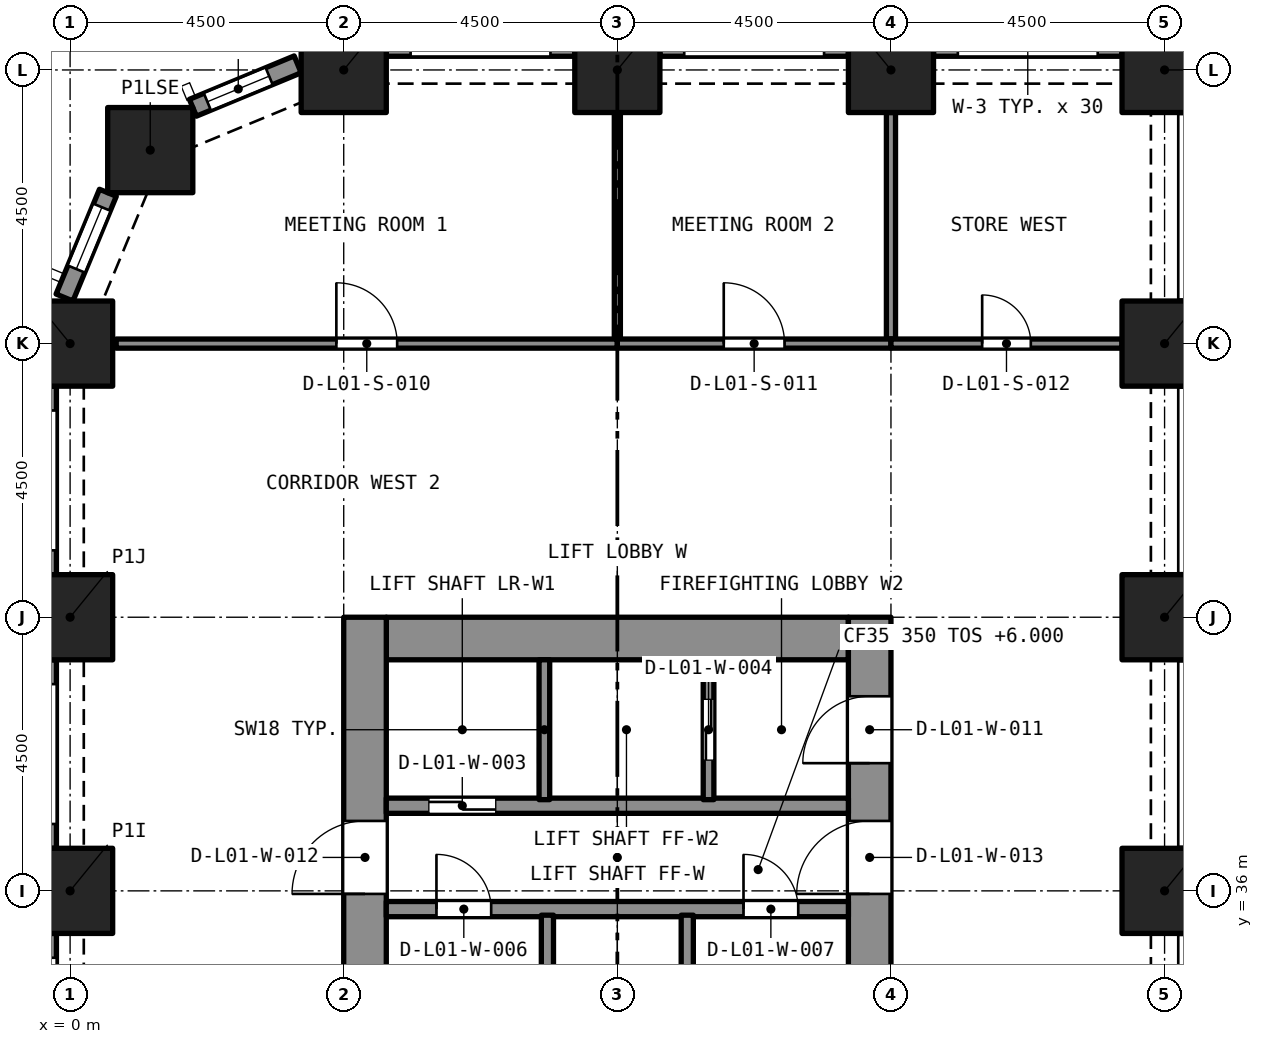
"""IFC4 building model, lengths in metres.
Left out: names, types, materials, properties, quantities, classifications, styles, units other than length and angle.
Written with IfcOpenShell. Run it as: python <this file> out.ifc"""

import sys

from ifc_helpers import new_model, si_unit, direction, frame, frame_2d, origin, origin_2d, place, context, subcontext, project, spatial, rectangle, extrude, element, fill, save


model = new_model("IFC4")
c1 = context("Model", 3, precision=1e-05, world=origin(), true_north=direction((0.0, 1.0)))
c2 = subcontext(c1, "Body", "Model", "MODEL_VIEW")
j1 = project(units=[si_unit("LENGTHUNIT", "METRE"), si_unit("PLANEANGLEUNIT", "RADIAN")], contexts=[c1])
p1 = place(None, origin())
s1 = spatial("IfcSite", under=j1, at=p1, CompositionType="ELEMENT")
p2 = place(p1, origin())
s2 = spatial("IfcBuilding", under=s1, at=p2, CompositionType="ELEMENT")
p3 = place(p2, frame((0.0, 0.0, 6.0)))
s3 = spatial("IfcBuildingStorey", under=s2, at=p3, CompositionType="ELEMENT", Elevation=6.0)
for number, where, z_axis, x_axis in (
    (1, (0.0, 36.0, 0.0), (0.0, 0.0, 1.0), (1.0, 0.0, 0.0)),
    (2, (18.0, 36.0, 0.0), (0.0, 0.0, 1.0), (1.0, 0.0, 0.0)),
    (3, (0.0, 40.5, 0.0), (0.0, 0.0, 1.0), (1.0, 0.0, 0.0)),
    (4, (18.0, 40.5, 0.0), (0.0, 0.0, 1.0), (1.0, 0.0, 0.0)),
    (5, (0.0, 45.0, 0.0), (0.0, 0.0, 1.0), (1.0, 0.0, 0.0)),
    (6, (18.0, 45.0, 0.0), (0.0, 0.0, 1.0), (1.0, 0.0, 0.0)),
    (7, (1.318, 48.182, 0.0), (0.0, 0.0, 1.0), (1.0, 0.0, 0.0)),
    (8, (4.5, 49.5, 0.0), (0.0, 0.0, 1.0), (1.0, 0.0, 0.0)),
    (9, (9.0, 49.5, 0.0), (0.0, 0.0, 1.0), (1.0, 0.0, 0.0)),
    (10, (13.5, 49.5, 0.0), (0.0, 0.0, 1.0), (1.0, 0.0, 0.0)),
    (11, (18.0, 49.5, 0.0), (0.0, 0.0, 1.0), (1.0, 0.0, 0.0)),
):
    element("IfcColumn", number, at=place(p3, frame(where, z_axis=z_axis, x_axis=x_axis)), inside=s3, PredefinedType="COLUMN", context=c2, shape_type="SweptSolid", body=[
        extrude(rectangle(XDim=1.4, YDim=1.4, at=origin_2d()), origin(), (0.0, 0.0, 1.0), 5.0),
    ])
p4 = place(p3, frame((5.2, 40.15, 0.0), z_axis=(0.0, 0.0, 1.0), x_axis=(1.0, 0.0, 0.0)))
e12 = element("IfcWall", 12, at=p4, inside=s3, PredefinedType="SOLIDWALL", context=c2, shape_type="SweptSolid", body=[
    extrude(rectangle(XDim=7.6, YDim=0.7, at=frame_2d((3.8, 0.0))), origin(), (0.0, 0.0, 1.0), 5.0),
])
p5 = place(p3, frame((4.85, 27.0, 0.0), z_axis=(0.0, 0.0, 1.0), x_axis=(0.0, 1.0, 0.0)))
e13 = element("IfcWall", 13, at=p5, inside=s3, PredefinedType="SOLIDWALL", context=c2, shape_type="SweptSolid", body=[
    extrude(rectangle(XDim=13.5, YDim=0.7, at=frame_2d((6.75, 0.0))), origin(), (0.0, 0.0, 1.0), 5.0),
])
p6 = place(p5, frame((8.95, 0.0, 0.0)))
e14 = element("IfcOpeningElement", 14, at=p6, cuts=e13, PredefinedType="OPENING", context=c2, shape_type="SweptSolid", body=[
    extrude(rectangle(XDim=1.2, YDim=2.1, at=frame_2d((0.6, 1.05))), frame((0.0, 0.36, 0.0), z_axis=(0.0, -1.0, 0.0), x_axis=(1.0, 0.0, 0.0)), (0.0, 0.0, 1.0), 0.72),
])
p7 = place(p3, frame((13.15, 27.0, 0.0), z_axis=(0.0, 0.0, 1.0), x_axis=(0.0, 1.0, 0.0)))
e15 = element("IfcWall", 15, at=p7, inside=s3, PredefinedType="SOLIDWALL", context=c2, shape_type="SweptSolid", body=[
    extrude(rectangle(XDim=13.5, YDim=0.7, at=frame_2d((6.75, 0.0))), origin(), (0.0, 0.0, 1.0), 5.0),
])
p8 = place(p7, frame((11.1, 0.0, 0.0)))
e16 = element("IfcOpeningElement", 16, at=p8, cuts=e15, PredefinedType="OPENING", context=c2, shape_type="SweptSolid", body=[
    extrude(rectangle(XDim=1.1, YDim=2.1, at=frame_2d((0.55, 1.05))), frame((0.0, 0.36, 0.0), z_axis=(0.0, -1.0, 0.0), x_axis=(1.0, 0.0, 0.0)), (0.0, 0.0, 1.0), 0.72),
])
p9 = place(p7, frame((8.95, 0.0, 0.0)))
e17 = element("IfcOpeningElement", 17, at=p9, cuts=e15, PredefinedType="OPENING", context=c2, shape_type="SweptSolid", body=[
    extrude(rectangle(XDim=1.2, YDim=2.1, at=frame_2d((0.6, 1.05))), frame((0.0, 0.36, 0.0), z_axis=(0.0, -1.0, 0.0), x_axis=(1.0, 0.0, 0.0)), (0.0, 0.0, 1.0), 0.72),
])
p10 = place(p3, frame((14.2, 49.875, 0.0), z_axis=(0.0, 0.0, 1.0), x_axis=(1.0, 0.0, 0.0)))
e18 = element("IfcWall", 18, at=p10, inside=s3, PredefinedType="SOLIDWALL", context=c2, shape_type="SweptSolid", body=[
    extrude(rectangle(XDim=3.1, YDim=0.3, at=frame_2d((1.55, 0.0))), origin(), (0.0, 0.0, 1.0), 5.0),
])
p11 = place(p10, frame((0.4, 0.0, 0.45)))
e19 = element("IfcOpeningElement", 19, at=p11, cuts=e18, PredefinedType="OPENING", context=c2, shape_type="SweptSolid", body=[
    extrude(rectangle(XDim=2.3, YDim=3.3, at=frame_2d((1.15, 1.65))), frame((0.0, 0.16, 0.0), z_axis=(0.0, -1.0, 0.0), x_axis=(1.0, 0.0, 0.0)), (0.0, 0.0, 1.0), 0.32),
])
p12 = place(p3, frame((9.7, 49.875, 0.0), z_axis=(0.0, 0.0, 1.0), x_axis=(1.0, 0.0, 0.0)))
e20 = element("IfcWall", 20, at=p12, inside=s3, PredefinedType="SOLIDWALL", context=c2, shape_type="SweptSolid", body=[
    extrude(rectangle(XDim=3.1, YDim=0.3, at=frame_2d((1.55, 0.0))), origin(), (0.0, 0.0, 1.0), 5.0),
])
p13 = place(p12, frame((0.4, 0.0, 0.45)))
e21 = element("IfcOpeningElement", 21, at=p13, cuts=e20, PredefinedType="OPENING", context=c2, shape_type="SweptSolid", body=[
    extrude(rectangle(XDim=2.3, YDim=3.3, at=frame_2d((1.15, 1.65))), frame((0.0, 0.16, 0.0), z_axis=(0.0, -1.0, 0.0), x_axis=(1.0, 0.0, 0.0)), (0.0, 0.0, 1.0), 0.32),
])
p14 = place(p3, frame((5.2, 49.875, 0.0), z_axis=(0.0, 0.0, 1.0), x_axis=(1.0, 0.0, 0.0)))
e22 = element("IfcWall", 22, at=p14, inside=s3, PredefinedType="SOLIDWALL", context=c2, shape_type="SweptSolid", body=[
    extrude(rectangle(XDim=3.1, YDim=0.3, at=frame_2d((1.55, 0.0))), origin(), (0.0, 0.0, 1.0), 5.0),
])
p15 = place(p14, frame((0.4, 0.0, 0.45)))
e23 = element("IfcOpeningElement", 23, at=p15, cuts=e22, PredefinedType="OPENING", context=c2, shape_type="SweptSolid", body=[
    extrude(rectangle(XDim=2.3, YDim=3.3, at=frame_2d((1.15, 1.65))), frame((0.0, 0.16, 0.0), z_axis=(0.0, -1.0, 0.0), x_axis=(1.0, 0.0, 0.0)), (0.0, 0.0, 1.0), 0.32),
])
p16 = place(p3, frame((2.02, 48.878, 0.0), z_axis=(0.0, 0.0, 1.0), x_axis=(0.923903565336, 0.38262540684, 0.0)))
e24 = element("IfcWall", 24, at=p16, inside=s3, PredefinedType="SOLIDWALL", context=c2, shape_type="SweptSolid", body=[
    extrude(rectangle(XDim=1.865, YDim=0.3, at=frame_2d((0.933, 0.0))), origin(), (0.0, 0.0, 1.0), 5.0),
])
p17 = place(p16, frame((0.258, 0.0, 0.45)))
e25 = element("IfcOpeningElement", 25, at=p17, cuts=e24, PredefinedType="OPENING", context=c2, shape_type="SweptSolid", body=[
    extrude(rectangle(XDim=1.1, YDim=3.3, at=frame_2d((0.55, 1.65))), frame((0.0, 0.16, 0.0), z_axis=(0.0, -1.0, 0.0), x_axis=(1.0, 0.0, 0.0)), (0.0, 0.0, 1.0), 0.32),
])
p18 = place(p3, frame((-0.092, 45.757, 0.0), z_axis=(0.0, 0.0, 1.0), x_axis=(0.382737135771, 0.923857286003, 0.0)))
e26 = element("IfcWall", 26, at=p18, inside=s3, PredefinedType="SOLIDWALL", context=c2, shape_type="SweptSolid", body=[
    extrude(rectangle(XDim=1.865, YDim=0.3, at=frame_2d((0.933, 0.0))), origin(), (0.0, 0.0, 1.0), 5.0),
])
p19 = place(p18, frame((0.508, 0.0, 0.45)))
e27 = element("IfcOpeningElement", 27, at=p19, cuts=e26, PredefinedType="OPENING", context=c2, shape_type="SweptSolid", body=[
    extrude(rectangle(XDim=1.1, YDim=3.3, at=frame_2d((0.55, 1.65))), frame((0.0, 0.16, 0.0), z_axis=(0.0, -1.0, 0.0), x_axis=(1.0, 0.0, 0.0)), (0.0, 0.0, 1.0), 0.32),
])
p20 = place(p3, frame((-0.375, 41.2, 0.0), z_axis=(0.0, 0.0, 1.0), x_axis=(0.0, 1.0, 0.0)))
e28 = element("IfcWall", 28, at=p20, inside=s3, PredefinedType="SOLIDWALL", context=c2, shape_type="SweptSolid", body=[
    extrude(rectangle(XDim=3.1, YDim=0.3, at=frame_2d((1.55, 0.0))), origin(), (0.0, 0.0, 1.0), 5.0),
])
p21 = place(p20, frame((0.4, 0.0, 0.45)))
e29 = element("IfcOpeningElement", 29, at=p21, cuts=e28, PredefinedType="OPENING", context=c2, shape_type="SweptSolid", body=[
    extrude(rectangle(XDim=2.3, YDim=3.3, at=frame_2d((1.15, 1.65))), frame((0.0, 0.16, 0.0), z_axis=(0.0, -1.0, 0.0), x_axis=(1.0, 0.0, 0.0)), (0.0, 0.0, 1.0), 0.32),
])
p22 = place(p3, frame((-0.375, 36.7, 0.0), z_axis=(0.0, 0.0, 1.0), x_axis=(0.0, 1.0, 0.0)))
e30 = element("IfcWall", 30, at=p22, inside=s3, PredefinedType="SOLIDWALL", context=c2, shape_type="SweptSolid", body=[
    extrude(rectangle(XDim=3.1, YDim=0.3, at=frame_2d((1.55, 0.0))), origin(), (0.0, 0.0, 1.0), 5.0),
])
p23 = place(p22, frame((0.4, 0.0, 0.45)))
e31 = element("IfcOpeningElement", 31, at=p23, cuts=e30, PredefinedType="OPENING", context=c2, shape_type="SweptSolid", body=[
    extrude(rectangle(XDim=2.3, YDim=3.3, at=frame_2d((1.15, 1.65))), frame((0.0, 0.16, 0.0), z_axis=(0.0, -1.0, 0.0), x_axis=(1.0, 0.0, 0.0)), (0.0, 0.0, 1.0), 0.32),
])
p24 = place(p3, frame((-0.375, 32.2, 0.0), z_axis=(0.0, 0.0, 1.0), x_axis=(0.0, 1.0, 0.0)))
e32 = element("IfcWall", 32, at=p24, inside=s3, PredefinedType="SOLIDWALL", context=c2, shape_type="SweptSolid", body=[
    extrude(rectangle(XDim=3.1, YDim=0.3, at=frame_2d((1.55, 0.0))), origin(), (0.0, 0.0, 1.0), 5.0),
])
p25 = place(p24, frame((0.4, 0.0, 0.45)))
e33 = element("IfcOpeningElement", 33, at=p25, cuts=e32, PredefinedType="OPENING", context=c2, shape_type="SweptSolid", body=[
    extrude(rectangle(XDim=2.3, YDim=3.3, at=frame_2d((1.15, 1.65))), frame((0.0, 0.16, 0.0), z_axis=(0.0, -1.0, 0.0), x_axis=(1.0, 0.0, 0.0)), (0.0, 0.0, 1.0), 0.32),
])
p26 = place(p3, frame((5.2, 35.7, 0.0), z_axis=(0.0, 0.0, 1.0), x_axis=(1.0, 0.0, 0.0)))
e34 = element("IfcWall", 34, at=p26, inside=s3, PredefinedType="SOLIDWALL", context=c2, shape_type="SweptSolid", body=[
    extrude(rectangle(XDim=7.6, YDim=0.25, at=frame_2d((3.8, 0.0))), origin(), (0.0, 0.0, 1.0), 4.65),
])
p27 = place(p26, frame((0.825, 0.0, 0.0)))
e35 = element("IfcOpeningElement", 35, at=p27, cuts=e34, PredefinedType="OPENING", context=c2, shape_type="SweptSolid", body=[
    extrude(rectangle(XDim=0.9, YDim=2.1, at=frame_2d((0.45, 1.05))), frame((0.0, 0.135, 0.0), z_axis=(0.0, -1.0, 0.0), x_axis=(1.0, 0.0, 0.0)), (0.0, 0.0, 1.0), 0.27),
])
p28 = place(p26, frame((5.875, 0.0, 0.0)))
e36 = element("IfcOpeningElement", 36, at=p28, cuts=e34, PredefinedType="OPENING", context=c2, shape_type="SweptSolid", body=[
    extrude(rectangle(XDim=0.9, YDim=2.1, at=frame_2d((0.45, 1.05))), frame((0.0, 0.135, 0.0), z_axis=(0.0, -1.0, 0.0), x_axis=(1.0, 0.0, 0.0)), (0.0, 0.0, 1.0), 0.27),
])
p29 = place(p3, frame((5.2, 37.4, 0.0), z_axis=(0.0, 0.0, 1.0), x_axis=(1.0, 0.0, 0.0)))
e37 = element("IfcWall", 37, at=p29, inside=s3, PredefinedType="SOLIDWALL", context=c2, shape_type="SweptSolid", body=[
    extrude(rectangle(XDim=7.6, YDim=0.25, at=frame_2d((3.8, 0.0))), origin(), (0.0, 0.0, 1.0), 4.65),
])
p30 = place(p29, frame((0.7, 0.0, 0.0)))
e38 = element("IfcOpeningElement", 38, at=p30, cuts=e37, PredefinedType="OPENING", context=c2, shape_type="SweptSolid", body=[
    extrude(rectangle(XDim=1.1, YDim=2.4, at=frame_2d((0.55, 1.2))), frame((0.0, 0.135, 0.0), z_axis=(0.0, -1.0, 0.0), x_axis=(1.0, 0.0, 0.0)), (0.0, 0.0, 1.0), 0.27),
])
for number, where, z_axis, x_axis in (
    (39, (7.85, 33.3, 0.0), (0.0, 0.0, 1.0), (0.0, 1.0, 0.0)),
    (40, (10.15, 33.3, 0.0), (0.0, 0.0, 1.0), (0.0, 1.0, 0.0)),
):
    element("IfcWall", number, at=place(p3, frame(where, z_axis=z_axis, x_axis=x_axis)), inside=s3, PredefinedType="SOLIDWALL", context=c2, shape_type="SweptSolid", body=[
        extrude(rectangle(XDim=2.3, YDim=0.2, at=frame_2d((1.15, 0.0))), origin(), (0.0, 0.0, 1.0), 4.65),
    ])
p31 = place(p3, frame((7.8, 37.5, 0.0), z_axis=(0.0, 0.0, 1.0), x_axis=(0.0, 1.0, 0.0)))
e41 = element("IfcWall", 41, at=p31, inside=s3, PredefinedType="SOLIDWALL", context=c2, shape_type="SweptSolid", body=[
    extrude(rectangle(XDim=2.3, YDim=0.175, at=frame_2d((1.15, 0.0))), origin(), (0.0, 0.0, 1.0), 4.65),
])
p32 = place(p3, frame((10.5, 37.5, 0.0), z_axis=(0.0, 0.0, 1.0), x_axis=(0.0, 1.0, 0.0)))
e42 = element("IfcWall", 42, at=p32, inside=s3, PredefinedType="SOLIDWALL", context=c2, shape_type="SweptSolid", body=[
    extrude(rectangle(XDim=2.3, YDim=0.175, at=frame_2d((1.15, 0.0))), origin(), (0.0, 0.0, 1.0), 4.65),
])
p33 = place(p32, frame((0.65, 0.0, 0.0)))
e43 = element("IfcOpeningElement", 43, at=p33, cuts=e42, PredefinedType="OPENING", context=c2, shape_type="SweptSolid", body=[
    extrude(rectangle(XDim=1.0, YDim=2.1, at=frame_2d((0.5, 1.05))), frame((0.0, 0.097, 0.0), z_axis=(0.0, -1.0, 0.0), x_axis=(1.0, 0.0, 0.0)), (0.0, 0.0, 1.0), 0.195),
])
p34 = place(p3, frame((9.0, 45.075, 0.0), z_axis=(0.0, 0.0, 1.0), x_axis=(0.0, 1.0, 0.0)))
e44 = element("IfcWall", 44, at=p34, inside=s3, PredefinedType="PARTITIONING", context=c2, shape_type="SweptSolid", body=[
    extrude(rectangle(XDim=3.725, YDim=0.1, at=frame_2d((1.863, 0.0))), origin(), (0.0, 0.0, 1.0), 4.65),
])
p35 = place(p3, frame((0.758, 45.0, 0.0), z_axis=(0.0, 0.0, 1.0), x_axis=(1.0, 0.0, 0.0)))
e45 = element("IfcWall", 45, at=p35, inside=s3, PredefinedType="PARTITIONING", context=c2, shape_type="SweptSolid", body=[
    extrude(rectangle(XDim=8.242, YDim=0.15, at=frame_2d((4.121, 0.0))), origin(), (0.0, 0.0, 1.0), 4.65),
])
p36 = place(p35, frame((3.621, 0.0, 0.0)))
e46 = element("IfcOpeningElement", 46, at=p36, cuts=e45, PredefinedType="OPENING", context=c2, shape_type="SweptSolid", body=[
    extrude(rectangle(XDim=1.0, YDim=2.1, at=frame_2d((0.5, 1.05))), frame((0.0, 0.085, 0.0), z_axis=(0.0, -1.0, 0.0), x_axis=(1.0, 0.0, 0.0)), (0.0, 0.0, 1.0), 0.17),
])
p37 = place(p3, frame((13.5, 45.075, 0.0), z_axis=(0.0, 0.0, 1.0), x_axis=(0.0, 1.0, 0.0)))
e47 = element("IfcWall", 47, at=p37, inside=s3, PredefinedType="PARTITIONING", context=c2, shape_type="SweptSolid", body=[
    extrude(rectangle(XDim=3.725, YDim=0.15, at=frame_2d((1.863, 0.0))), origin(), (0.0, 0.0, 1.0), 4.65),
])
p38 = place(p3, frame((9.0, 45.0, 0.0), z_axis=(0.0, 0.0, 1.0), x_axis=(1.0, 0.0, 0.0)))
e48 = element("IfcWall", 48, at=p38, inside=s3, PredefinedType="PARTITIONING", context=c2, shape_type="SweptSolid", body=[
    extrude(rectangle(XDim=4.5, YDim=0.15, at=frame_2d((2.25, 0.0))), origin(), (0.0, 0.0, 1.0), 4.65),
])
p39 = place(p38, frame((1.75, 0.0, 0.0)))
e49 = element("IfcOpeningElement", 49, at=p39, cuts=e48, PredefinedType="OPENING", context=c2, shape_type="SweptSolid", body=[
    extrude(rectangle(XDim=1.0, YDim=2.1, at=frame_2d((0.5, 1.05))), frame((0.0, 0.085, 0.0), z_axis=(0.0, -1.0, 0.0), x_axis=(1.0, 0.0, 0.0)), (0.0, 0.0, 1.0), 0.17),
])
p40 = place(p3, frame((13.5, 45.0, 0.0), z_axis=(0.0, 0.0, 1.0), x_axis=(1.0, 0.0, 0.0)))
e50 = element("IfcWall", 50, at=p40, inside=s3, PredefinedType="PARTITIONING", context=c2, shape_type="SweptSolid", body=[
    extrude(rectangle(XDim=3.8, YDim=0.15, at=frame_2d((1.9, 0.0))), origin(), (0.0, 0.0, 1.0), 4.65),
])
p41 = place(p40, frame((1.5, 0.0, 0.0)))
e51 = element("IfcOpeningElement", 51, at=p41, cuts=e50, PredefinedType="OPENING", context=c2, shape_type="SweptSolid", body=[
    extrude(rectangle(XDim=0.8, YDim=2.1, at=frame_2d((0.4, 1.05))), frame((0.0, 0.085, 0.0), z_axis=(0.0, -1.0, 0.0), x_axis=(1.0, 0.0, 0.0)), (0.0, 0.0, 1.0), 0.17),
])
p42 = place(p17, origin())
e52 = element("IfcWindow", 52, at=p42, inside=s3, PartitioningType="SINGLE_PANEL", PredefinedType="WINDOW", context=c2, shape_type="SweptSolid", body=[
    extrude(rectangle(XDim=1.1, YDim=3.3, at=frame_2d((0.55, 1.65))), frame((0.0, 0.03, 0.0), z_axis=(0.0, -1.0, 0.0), x_axis=(1.0, 0.0, 0.0)), (0.0, 0.0, 1.0), 0.06),
])
fill(e25, e52)
p43 = place(p19, origin())
e53 = element("IfcWindow", 53, at=p43, inside=s3, PartitioningType="SINGLE_PANEL", PredefinedType="WINDOW", context=c2, shape_type="SweptSolid", body=[
    extrude(rectangle(XDim=1.1, YDim=3.3, at=frame_2d((0.55, 1.65))), frame((0.0, 0.03, 0.0), z_axis=(0.0, -1.0, 0.0), x_axis=(1.0, 0.0, 0.0)), (0.0, 0.0, 1.0), 0.06),
])
fill(e27, e53)
p44 = place(p30, origin())
e54 = element("IfcDoor", 54, at=p44, inside=s3, OperationType="SLIDING_TO_LEFT", PredefinedType="DOOR", context=c2, shape_type="SweptSolid", body=[
    extrude(rectangle(XDim=1.1, YDim=2.4, at=frame_2d((0.55, 1.2))), frame((0.0, 0.025, 0.0), z_axis=(0.0, -1.0, 0.0), x_axis=(1.0, 0.0, 0.0)), (0.0, 0.0, 1.0), 0.05),
])
fill(e38, e54)
p45 = place(p33, origin())
e55 = element("IfcDoor", 55, at=p45, inside=s3, OperationType="SLIDING_TO_LEFT", PredefinedType="DOOR", context=c2, shape_type="SweptSolid", body=[
    extrude(rectangle(XDim=1.0, YDim=2.1, at=frame_2d((0.5, 1.05))), frame((0.0, 0.025, 0.0), z_axis=(0.0, -1.0, 0.0), x_axis=(1.0, 0.0, 0.0)), (0.0, 0.0, 1.0), 0.05),
])
fill(e43, e55)
p46 = place(p27, origin())
e56 = element("IfcDoor", 56, at=p46, inside=s3, OperationType="SINGLE_SWING_LEFT", PredefinedType="DOOR", context=c2, shape_type="SweptSolid", body=[
    extrude(rectangle(XDim=0.9, YDim=2.1, at=frame_2d((0.45, 1.05))), frame((0.0, 0.025, 0.0), z_axis=(0.0, -1.0, 0.0), x_axis=(1.0, 0.0, 0.0)), (0.0, 0.0, 1.0), 0.05),
])
fill(e35, e56)
p47 = place(p28, origin())
e57 = element("IfcDoor", 57, at=p47, inside=s3, OperationType="SINGLE_SWING_LEFT", PredefinedType="DOOR", context=c2, shape_type="SweptSolid", body=[
    extrude(rectangle(XDim=0.9, YDim=2.1, at=frame_2d((0.45, 1.05))), frame((0.0, 0.025, 0.0), z_axis=(0.0, -1.0, 0.0), x_axis=(1.0, 0.0, 0.0)), (0.0, 0.0, 1.0), 0.05),
])
fill(e36, e57)
p48 = place(p8, origin())
e58 = element("IfcDoor", 58, at=p48, inside=s3, OperationType="SINGLE_SWING_LEFT", PredefinedType="DOOR", context=c2, shape_type="SweptSolid", body=[
    extrude(rectangle(XDim=1.1, YDim=2.1, at=frame_2d((0.55, 1.05))), frame((0.0, 0.025, 0.0), z_axis=(0.0, -1.0, 0.0), x_axis=(1.0, 0.0, 0.0)), (0.0, 0.0, 1.0), 0.05),
])
fill(e16, e58)
p49 = place(p6, origin())
e59 = element("IfcDoor", 59, at=p49, inside=s3, OperationType="SINGLE_SWING_LEFT", PredefinedType="DOOR", context=c2, shape_type="SweptSolid", body=[
    extrude(rectangle(XDim=1.2, YDim=2.1, at=frame_2d((0.6, 1.05))), frame((0.0, 0.025, 0.0), z_axis=(0.0, -1.0, 0.0), x_axis=(1.0, 0.0, 0.0)), (0.0, 0.0, 1.0), 0.05),
])
fill(e14, e59)
p50 = place(p9, origin())
e60 = element("IfcDoor", 60, at=p50, inside=s3, OperationType="SINGLE_SWING_LEFT", PredefinedType="DOOR", context=c2, shape_type="SweptSolid", body=[
    extrude(rectangle(XDim=1.2, YDim=2.1, at=frame_2d((0.6, 1.05))), frame((0.0, 0.025, 0.0), z_axis=(0.0, -1.0, 0.0), x_axis=(1.0, 0.0, 0.0)), (0.0, 0.0, 1.0), 0.05),
])
fill(e17, e60)
p51 = place(p36, origin())
e61 = element("IfcDoor", 61, at=p51, inside=s3, OperationType="SINGLE_SWING_RIGHT", PredefinedType="DOOR", context=c2, shape_type="SweptSolid", body=[
    extrude(rectangle(XDim=1.0, YDim=2.1, at=frame_2d((0.5, 1.05))), frame((0.0, 0.025, 0.0), z_axis=(0.0, -1.0, 0.0), x_axis=(1.0, 0.0, 0.0)), (0.0, 0.0, 1.0), 0.05),
])
fill(e46, e61)
p52 = place(p39, origin())
e62 = element("IfcDoor", 62, at=p52, inside=s3, OperationType="SINGLE_SWING_RIGHT", PredefinedType="DOOR", context=c2, shape_type="SweptSolid", body=[
    extrude(rectangle(XDim=1.0, YDim=2.1, at=frame_2d((0.5, 1.05))), frame((0.0, 0.025, 0.0), z_axis=(0.0, -1.0, 0.0), x_axis=(1.0, 0.0, 0.0)), (0.0, 0.0, 1.0), 0.05),
])
fill(e49, e62)
p53 = place(p41, origin())
e63 = element("IfcDoor", 63, at=p53, inside=s3, OperationType="SINGLE_SWING_RIGHT", PredefinedType="DOOR", context=c2, shape_type="SweptSolid", body=[
    extrude(rectangle(XDim=0.8, YDim=2.1, at=frame_2d((0.4, 1.05))), frame((0.0, 0.025, 0.0), z_axis=(0.0, -1.0, 0.0), x_axis=(1.0, 0.0, 0.0)), (0.0, 0.0, 1.0), 0.05),
])
fill(e51, e63)
save(model, sys.argv[1])
